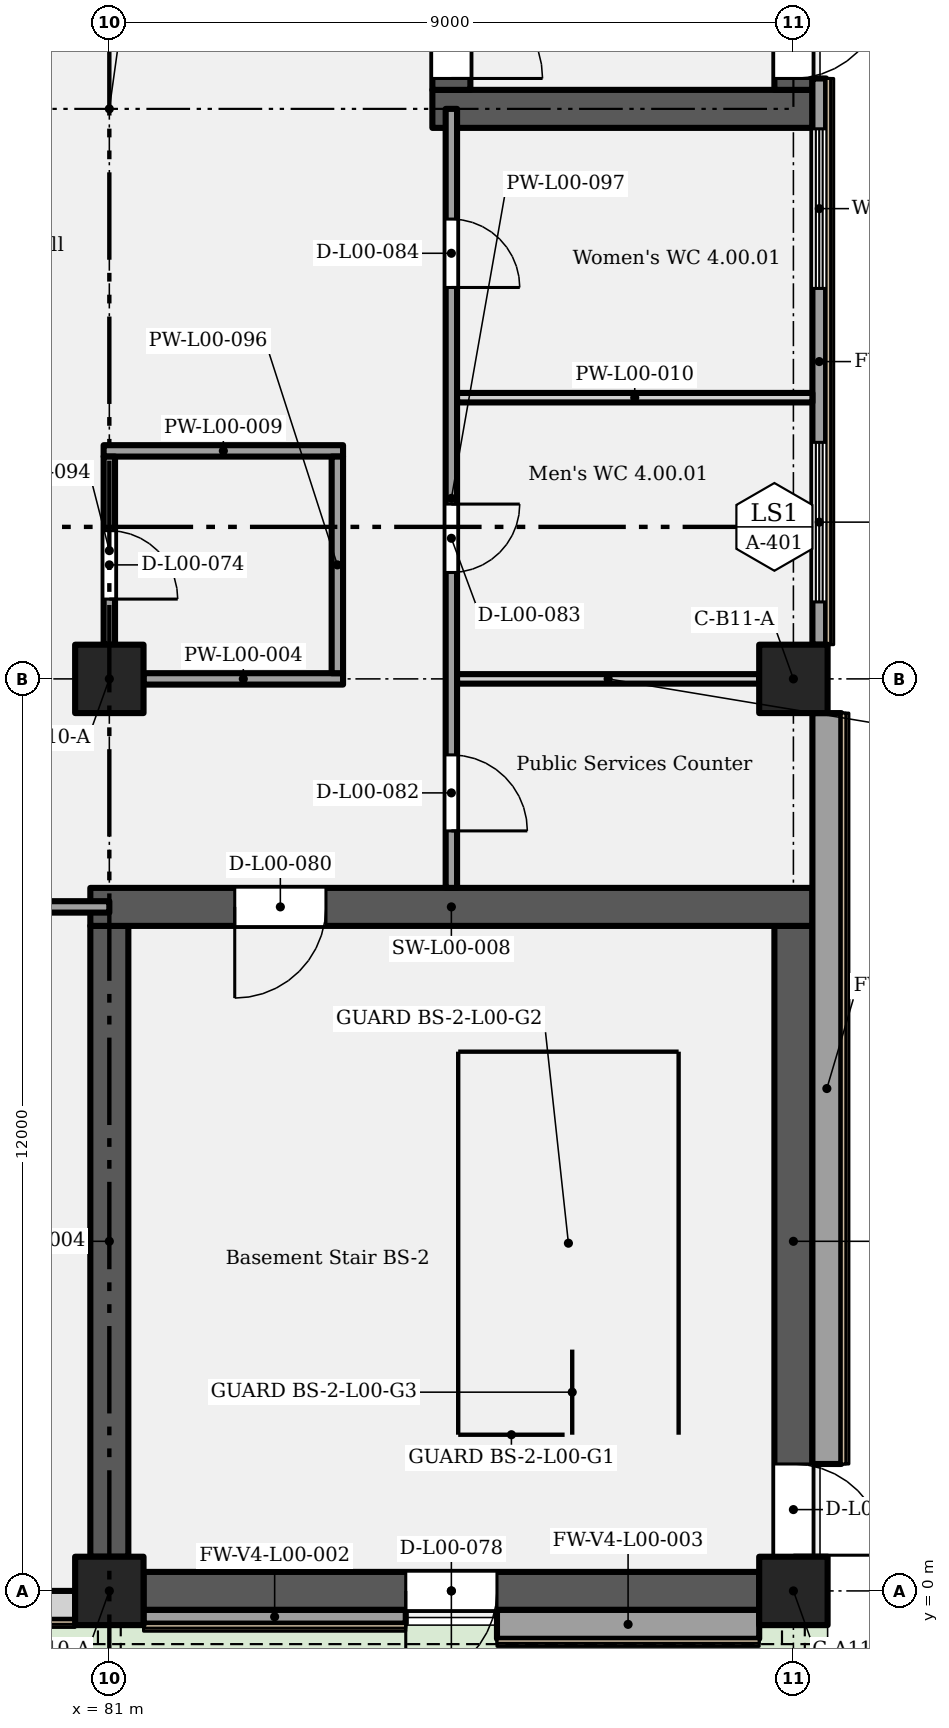
"""IFC4 building model, lengths in metres.
Left out: names, types, materials, properties, quantities, classifications, styles, units other than length and angle.
Written with IfcOpenShell. Run it as: python <this file> out.ifc"""

import sys

from ifc_helpers import new_model, si_unit, direction, frame, frame_2d, origin, origin_2d, place, context, subcontext, project, spatial, rectangle, extrude, element, fill, save


model = new_model("IFC4")
c1 = context("Model", 3, precision=1e-05, world=origin(), true_north=direction((0.0, 1.0)))
c2 = subcontext(c1, "Body", "Model", "MODEL_VIEW")
j1 = project(units=[si_unit("LENGTHUNIT", "METRE"), si_unit("PLANEANGLEUNIT", "RADIAN")], contexts=[c1])
p1 = place(None, origin())
s1 = spatial("IfcSite", under=j1, at=p1, CompositionType="ELEMENT")
p2 = place(p1, origin())
s2 = spatial("IfcBuilding", under=s1, at=p2, CompositionType="ELEMENT")
p3 = place(p2, origin())
s3 = spatial("IfcBuildingStorey", under=s2, at=p3, CompositionType="ELEMENT", Elevation=0.0)
for number, where, z_axis, x_axis in (
    (1, (81.0, 0.0, 0.0), (0.0, 0.0, 1.0), (1.0, 0.0, 0.0)),
    (2, (90.0, 0.0, 0.0), (0.0, 0.0, 1.0), (1.0, 0.0, 0.0)),
    (3, (81.0, 12.0, 0.0), (0.0, 0.0, 1.0), (1.0, 0.0, 0.0)),
    (4, (90.0, 12.0, 0.0), (0.0, 0.0, 1.0), (1.0, 0.0, 0.0)),
):
    element("IfcColumn", number, at=place(p3, frame(where, z_axis=z_axis, x_axis=x_axis)), inside=s3, PredefinedType="COLUMN", context=c2, shape_type="SweptSolid", body=[
        extrude(rectangle(XDim=0.9, YDim=0.9, at=origin_2d()), origin(), (0.0, 0.0, 1.0), 6.6),
    ])
p4 = place(p3, frame((81.45, 0.0, 0.0), z_axis=(0.0, 0.0, 1.0), x_axis=(1.0, 0.0, 0.0)))
e5 = element("IfcWall", 5, at=p4, inside=s3, PredefinedType="SHEAR", context=c2, shape_type="SweptSolid", body=[
    extrude(rectangle(XDim=8.1, YDim=0.5, at=frame_2d((4.05, 0.0))), origin(), (0.0, 0.0, 1.0), 6.3),
])
p5 = place(p4, frame((4.65, 0.0, 0.0), z_axis=(0.0, 0.0, 1.0), x_axis=(-1.0, 0.0, 0.0)))
e6 = element("IfcOpeningElement", 6, at=p5, cuts=e5, PredefinedType="OPENING", context=c2, shape_type="SweptSolid", body=[
    extrude(rectangle(XDim=1.2, YDim=2.1, at=frame_2d((0.6, 1.05))), frame((0.0, 0.26, 0.0), z_axis=(0.0, -1.0, 0.0), x_axis=(1.0, 0.0, 0.0)), (0.0, 0.0, 1.0), 0.52),
])
p6 = place(p3, frame((81.0, 0.45, 0.0), z_axis=(0.0, 0.0, 1.0), x_axis=(0.0, 1.0, 0.0)))
e7 = element("IfcWall", 7, at=p6, inside=s3, PredefinedType="SHEAR", context=c2, shape_type="SweptSolid", body=[
    extrude(rectangle(XDim=8.3, YDim=0.5, at=frame_2d((4.15, 0.0))), origin(), (0.0, 0.0, 1.0), 6.3),
])
p7 = place(p3, frame((90.0, 0.45, 0.0), z_axis=(0.0, 0.0, 1.0), x_axis=(0.0, 1.0, 0.0)))
e8 = element("IfcWall", 8, at=p7, inside=s3, PredefinedType="SHEAR", context=c2, shape_type="SweptSolid", body=[
    extrude(rectangle(XDim=8.3, YDim=0.5, at=frame_2d((4.15, 0.0))), origin(), (0.0, 0.0, 1.0), 6.3),
])
p8 = place(p7, frame((1.22, 0.0, 0.0), z_axis=(0.0, 0.0, 1.0), x_axis=(-1.0, 0.0, 0.0)))
e9 = element("IfcOpeningElement", 9, at=p8, cuts=e8, PredefinedType="OPENING", context=c2, shape_type="SweptSolid", body=[
    extrude(rectangle(XDim=1.2, YDim=2.1, at=frame_2d((0.6, 1.05))), frame((0.0, 0.26, 0.0), z_axis=(0.0, -1.0, 0.0), x_axis=(1.0, 0.0, 0.0)), (0.0, 0.0, 1.0), 0.52),
])
p9 = place(p3, frame((80.75, 9.0, 0.0), z_axis=(0.0, 0.0, 1.0), x_axis=(1.0, 0.0, 0.0)))
e10 = element("IfcWall", 10, at=p9, inside=s3, PredefinedType="SHEAR", context=c2, shape_type="SweptSolid", body=[
    extrude(rectangle(XDim=9.5, YDim=0.5, at=frame_2d((4.75, 0.0))), origin(), (0.0, 0.0, 1.0), 6.3),
])
p10 = place(p9, frame((3.1, 0.0, 0.0), z_axis=(0.0, 0.0, 1.0), x_axis=(-1.0, 0.0, 0.0)))
e11 = element("IfcOpeningElement", 11, at=p10, cuts=e10, PredefinedType="OPENING", context=c2, shape_type="SweptSolid", body=[
    extrude(rectangle(XDim=1.2, YDim=2.4, at=frame_2d((0.6, 1.2))), frame((0.0, 0.26, 0.0), z_axis=(0.0, -1.0, 0.0), x_axis=(1.0, 0.0, 0.0)), (0.0, 0.0, 1.0), 0.52),
])
p11 = place(p3, frame((85.25, 19.5, 0.0), z_axis=(0.0, 0.0, 1.0), x_axis=(1.0, 0.0, 0.0)))
e12 = element("IfcWall", 12, at=p11, inside=s3, PredefinedType="SHEAR", context=c2, shape_type="SweptSolid", body=[
    extrude(rectangle(XDim=5.0, YDim=0.5, at=frame_2d((2.5, 0.0))), origin(), (0.0, 0.0, 1.0), 6.3),
])
p12 = place(p3, frame((85.5, 19.75, 0.0), z_axis=(0.0, 0.0, 1.0), x_axis=(0.0, 1.0, 0.0)))
e13 = element("IfcWall", 13, at=p12, inside=s3, PredefinedType="SHEAR", context=c2, shape_type="SweptSolid", body=[
    extrude(rectangle(XDim=8.5, YDim=0.5, at=frame_2d((4.25, 0.0))), origin(), (0.0, 0.0, 1.0), 6.3),
])
p13 = place(p12, frame((1.35, 0.0, 0.0), z_axis=(0.0, 0.0, 1.0), x_axis=(-1.0, 0.0, 0.0)))
e14 = element("IfcOpeningElement", 14, at=p13, cuts=e13, PredefinedType="OPENING", context=c2, shape_type="SweptSolid", body=[
    extrude(rectangle(XDim=1.2, YDim=2.4, at=frame_2d((0.6, 1.2))), frame((0.0, 0.26, 0.0), z_axis=(0.0, -1.0, 0.0), x_axis=(1.0, 0.0, 0.0)), (0.0, 0.0, 1.0), 0.52),
])
p14 = place(p3, frame((90.0, 19.75, 0.0), z_axis=(0.0, 0.0, 1.0), x_axis=(0.0, 1.0, 0.0)))
e15 = element("IfcWall", 15, at=p14, inside=s3, PredefinedType="SHEAR", context=c2, shape_type="SweptSolid", body=[
    extrude(rectangle(XDim=8.3, YDim=0.5, at=frame_2d((4.15, 0.0))), origin(), (0.0, 0.0, 1.0), 6.3),
])
p15 = place(p14, frame((1.35, 0.0, 0.0), z_axis=(0.0, 0.0, 1.0), x_axis=(-1.0, 0.0, 0.0)))
e16 = element("IfcOpeningElement", 16, at=p15, cuts=e15, PredefinedType="OPENING", context=c2, shape_type="SweptSolid", body=[
    extrude(rectangle(XDim=1.2, YDim=2.1, at=frame_2d((0.6, 1.05))), frame((0.0, 0.26, 0.0), z_axis=(0.0, -1.0, 0.0), x_axis=(1.0, 0.0, 0.0)), (0.0, 0.0, 1.0), 0.52),
])
p16 = place(p3, frame((72.45, -0.19, 0.0), z_axis=(0.0, 0.0, 1.0), x_axis=(1.0, 0.0, 0.0)))
e17 = element("IfcWall", 17, at=p16, inside=s3, PredefinedType="SOLIDWALL", context=c2, shape_type="SweptSolid", body=[
    extrude(rectangle(XDim=8.1, YDim=0.38, at=frame_2d((4.05, 0.0))), origin(), (0.0, 0.0, 1.0), 6.3),
])
p17 = place(p16, frame((2.7, 0.0, 0.0), z_axis=(0.0, 0.0, 1.0), x_axis=(-1.0, 0.0, 0.0)))
e18 = element("IfcOpeningElement", 18, at=p17, cuts=e17, PredefinedType="OPENING", context=c2, shape_type="SweptSolid", body=[
    extrude(rectangle(XDim=1.8, YDim=2.1, at=frame_2d((0.9, 1.05))), frame((0.0, 0.2, 0.0), z_axis=(0.0, -1.0, 0.0), x_axis=(1.0, 0.0, 0.0)), (0.0, 0.0, 1.0), 0.4),
])
p18 = place(p16, frame((0.9, 0.0, 2.25)))
e19 = element("IfcOpeningElement", 19, at=p18, cuts=e17, PredefinedType="OPENING", context=c2, shape_type="SweptSolid", body=[
    extrude(rectangle(XDim=1.8, YDim=0.8, at=frame_2d((0.9, 0.4))), frame((0.0, 0.2, 0.0), z_axis=(0.0, -1.0, 0.0), x_axis=(1.0, 0.0, 0.0)), (0.0, 0.0, 1.0), 0.4),
])
p19 = place(p16, frame((7.2, 0.0, 0.0), z_axis=(0.0, 0.0, 1.0), x_axis=(-1.0, 0.0, 0.0)))
e20 = element("IfcOpeningElement", 20, at=p19, cuts=e17, PredefinedType="OPENING", context=c2, shape_type="SweptSolid", body=[
    extrude(rectangle(XDim=1.8, YDim=2.1, at=frame_2d((0.9, 1.05))), frame((0.0, 0.2, 0.0), z_axis=(0.0, -1.0, 0.0), x_axis=(1.0, 0.0, 0.0)), (0.0, 0.0, 1.0), 0.4),
])
p20 = place(p16, frame((5.4, 0.0, 2.25)))
e21 = element("IfcOpeningElement", 21, at=p20, cuts=e17, PredefinedType="OPENING", context=c2, shape_type="SweptSolid", body=[
    extrude(rectangle(XDim=1.8, YDim=0.8, at=frame_2d((0.9, 0.4))), frame((0.0, 0.2, 0.0), z_axis=(0.0, -1.0, 0.0), x_axis=(1.0, 0.0, 0.0)), (0.0, 0.0, 1.0), 0.4),
])
p21 = place(p3, frame((81.45, -0.34, 0.0), z_axis=(0.0, 0.0, 1.0), x_axis=(1.0, 0.0, 0.0)))
e22 = element("IfcWall", 22, at=p21, inside=s3, PredefinedType="SOLIDWALL", context=c2, shape_type="SweptSolid", body=[
    extrude(rectangle(XDim=3.45, YDim=0.18, at=frame_2d((1.725, 0.0))), origin(), (0.0, 0.0, 1.0), 6.3),
])
p22 = place(p3, frame((86.1, -0.44, 0.0), z_axis=(0.0, 0.0, 1.0), x_axis=(1.0, 0.0, 0.0)))
e23 = element("IfcWall", 23, at=p22, inside=s3, PredefinedType="SOLIDWALL", context=c2, shape_type="SweptSolid", body=[
    extrude(rectangle(XDim=3.45, YDim=0.38, at=frame_2d((1.725, 0.0))), origin(), (0.0, 0.0, 1.0), 6.3),
])
p23 = place(p3, frame((90.44, 1.67, 0.0), z_axis=(0.0, 0.0, 1.0), x_axis=(0.0, 1.0, 0.0)))
e24 = element("IfcWall", 24, at=p23, inside=s3, PredefinedType="SOLIDWALL", context=c2, shape_type="SweptSolid", body=[
    extrude(rectangle(XDim=9.88, YDim=0.38, at=frame_2d((4.94, 0.0))), origin(), (0.0, 0.0, 1.0), 6.3),
])
p24 = place(p3, frame((90.34, 12.45, 0.0), z_axis=(0.0, 0.0, 1.0), x_axis=(0.0, 1.0, 0.0)))
e25 = element("IfcWall", 25, at=p24, inside=s3, PredefinedType="SOLIDWALL", context=c2, shape_type="SweptSolid", body=[
    extrude(rectangle(XDim=7.45, YDim=0.18, at=frame_2d((3.725, 0.0))), origin(), (0.0, 0.0, 1.0), 6.3),
])
p25 = place(p24, frame((0.562, 0.0, 1.05)))
e26 = element("IfcOpeningElement", 26, at=p25, cuts=e25, PredefinedType="OPENING", context=c2, shape_type="SweptSolid", body=[
    extrude(rectangle(XDim=2.1, YDim=2.4, at=frame_2d((1.05, 1.2))), frame((0.0, 0.1, 0.0), z_axis=(0.0, -1.0, 0.0), x_axis=(1.0, 0.0, 0.0)), (0.0, 0.0, 1.0), 0.2),
])
p26 = place(p24, frame((4.688, 0.0, 1.05)))
e27 = element("IfcOpeningElement", 27, at=p26, cuts=e25, PredefinedType="OPENING", context=c2, shape_type="SweptSolid", body=[
    extrude(rectangle(XDim=2.1, YDim=2.4, at=frame_2d((1.05, 1.2))), frame((0.0, 0.1, 0.0), z_axis=(0.0, -1.0, 0.0), x_axis=(1.0, 0.0, 0.0)), (0.0, 0.0, 1.0), 0.2),
])
p27 = place(p3, frame((76.5, 9.0, 0.0), z_axis=(0.0, 0.0, 1.0), x_axis=(1.0, 0.0, 0.0)))
e28 = element("IfcWall", 28, at=p27, inside=s3, PredefinedType="PARTITIONING", context=c2, shape_type="SweptSolid", body=[
    extrude(rectangle(XDim=4.5, YDim=0.15, at=frame_2d((2.25, 0.0))), origin(), (0.0, 0.0, 1.0), 6.3),
])
p28 = place(p27, frame((3.15, 0.0, 0.0), z_axis=(0.0, 0.0, 1.0), x_axis=(-1.0, 0.0, 0.0)))
e29 = element("IfcOpeningElement", 29, at=p28, cuts=e28, PredefinedType="OPENING", context=c2, shape_type="SweptSolid", body=[
    extrude(rectangle(XDim=1.8, YDim=2.4, at=frame_2d((0.9, 1.2))), frame((0.0, 0.085, 0.0), z_axis=(0.0, -1.0, 0.0), x_axis=(1.0, 0.0, 0.0)), (0.0, 0.0, 1.0), 0.17),
])
p29 = place(p3, frame((81.45, 12.0, 0.0), z_axis=(0.0, 0.0, 1.0), x_axis=(1.0, 0.0, 0.0)))
e30 = element("IfcWall", 30, at=p29, inside=s3, PredefinedType="PARTITIONING", context=c2, shape_type="SweptSolid", body=[
    extrude(rectangle(XDim=2.625, YDim=0.15, at=frame_2d((1.312, 0.0))), origin(), (0.0, 0.0, 1.0), 5.55),
])
p30 = place(p3, frame((85.575, 12.0, 0.0), z_axis=(0.0, 0.0, 1.0), x_axis=(1.0, 0.0, 0.0)))
e31 = element("IfcWall", 31, at=p30, inside=s3, PredefinedType="PARTITIONING", context=c2, shape_type="SweptSolid", body=[
    extrude(rectangle(XDim=3.975, YDim=0.125, at=frame_2d((1.988, 0.0))), origin(), (0.0, 0.0, 1.0), 5.55),
])
p31 = place(p3, frame((80.925, 15.0, 0.0), z_axis=(0.0, 0.0, 1.0), x_axis=(1.0, 0.0, 0.0)))
e32 = element("IfcWall", 32, at=p31, inside=s3, PredefinedType="PARTITIONING", context=c2, shape_type="SweptSolid", body=[
    extrude(rectangle(XDim=3.15, YDim=0.15, at=frame_2d((1.575, 0.0))), origin(), (0.0, 0.0, 1.0), 6.3),
])
p32 = place(p3, frame((85.575, 15.7, 0.0), z_axis=(0.0, 0.0, 1.0), x_axis=(1.0, 0.0, 0.0)))
e33 = element("IfcWall", 33, at=p32, inside=s3, PredefinedType="PARTITIONING", context=c2, shape_type="SweptSolid", body=[
    extrude(rectangle(XDim=4.675, YDim=0.125, at=frame_2d((2.337, 0.0))), origin(), (0.0, 0.0, 1.0), 6.3),
])
p33 = place(p3, frame((81.0, 12.45, 0.0), z_axis=(0.0, 0.0, 1.0), x_axis=(0.0, 1.0, 0.0)))
e34 = element("IfcWall", 34, at=p33, inside=s3, PredefinedType="PARTITIONING", context=c2, shape_type="SweptSolid", body=[
    extrude(rectangle(XDim=2.475, YDim=0.15, at=frame_2d((1.238, 0.0))), origin(), (0.0, 0.0, 1.0), 5.35),
])
p34 = place(p33, frame((1.5, 0.0, 0.0), z_axis=(0.0, 0.0, 1.0), x_axis=(-1.0, 0.0, 0.0)))
e35 = element("IfcOpeningElement", 35, at=p34, cuts=e34, PredefinedType="OPENING", context=c2, shape_type="SweptSolid", body=[
    extrude(rectangle(XDim=0.9, YDim=2.4, at=frame_2d((0.45, 1.2))), frame((0.0, 0.085, 0.0), z_axis=(0.0, -1.0, 0.0), x_axis=(1.0, 0.0, 0.0)), (0.0, 0.0, 1.0), 0.17),
])
p35 = place(p3, frame((84.0, 12.075, 0.0), z_axis=(0.0, 0.0, 1.0), x_axis=(0.0, 1.0, 0.0)))
e36 = element("IfcWall", 36, at=p35, inside=s3, PredefinedType="PARTITIONING", context=c2, shape_type="SweptSolid", body=[
    extrude(rectangle(XDim=2.85, YDim=0.15, at=frame_2d((1.425, 0.0))), origin(), (0.0, 0.0, 1.0), 6.3),
])
p36 = place(p3, frame((85.5, 9.25, 0.0), z_axis=(0.0, 0.0, 1.0), x_axis=(0.0, 1.0, 0.0)))
e37 = element("IfcWall", 37, at=p36, inside=s3, PredefinedType="PARTITIONING", context=c2, shape_type="SweptSolid", body=[
    extrude(rectangle(XDim=10.25, YDim=0.15, at=frame_2d((5.125, 0.0))), origin(), (0.0, 0.0, 1.0), 6.3),
])
p37 = place(p36, frame((1.75, 0.0, 0.0), z_axis=(0.0, 0.0, 1.0), x_axis=(-1.0, 0.0, 0.0)))
e38 = element("IfcOpeningElement", 38, at=p37, cuts=e37, PredefinedType="OPENING", context=c2, shape_type="SweptSolid", body=[
    extrude(rectangle(XDim=1.0, YDim=2.4, at=frame_2d((0.5, 1.2))), frame((0.0, 0.085, 0.0), z_axis=(0.0, -1.0, 0.0), x_axis=(1.0, 0.0, 0.0)), (0.0, 0.0, 1.0), 0.17),
])
p38 = place(p36, frame((5.05, 0.0, 0.0), z_axis=(0.0, 0.0, 1.0), x_axis=(-1.0, 0.0, 0.0)))
e39 = element("IfcOpeningElement", 39, at=p38, cuts=e37, PredefinedType="OPENING", context=c2, shape_type="SweptSolid", body=[
    extrude(rectangle(XDim=0.9, YDim=2.4, at=frame_2d((0.45, 1.2))), frame((0.0, 0.085, 0.0), z_axis=(0.0, -1.0, 0.0), x_axis=(1.0, 0.0, 0.0)), (0.0, 0.0, 1.0), 0.17),
])
p39 = place(p36, frame((8.8, 0.0, 0.0), z_axis=(0.0, 0.0, 1.0), x_axis=(-1.0, 0.0, 0.0)))
e40 = element("IfcOpeningElement", 40, at=p39, cuts=e37, PredefinedType="OPENING", context=c2, shape_type="SweptSolid", body=[
    extrude(rectangle(XDim=0.9, YDim=2.4, at=frame_2d((0.45, 1.2))), frame((0.0, 0.085, 0.0), z_axis=(0.0, -1.0, 0.0), x_axis=(1.0, 0.0, 0.0)), (0.0, 0.0, 1.0), 0.17),
])
p40 = place(p5, origin())
e41 = element("IfcDoor", 41, at=p40, inside=s3, OperationType="SINGLE_SWING_LEFT", PredefinedType="DOOR", context=c2, shape_type="SweptSolid", body=[
    extrude(rectangle(XDim=1.2, YDim=2.1, at=frame_2d((0.6, 1.05))), frame((0.0, 0.025, 0.0), z_axis=(0.0, -1.0, 0.0), x_axis=(1.0, 0.0, 0.0)), (0.0, 0.0, 1.0), 0.05),
])
fill(e6, e41)
p41 = place(p8, origin())
e42 = element("IfcDoor", 42, at=p41, inside=s3, OperationType="SINGLE_SWING_LEFT", PredefinedType="DOOR", context=c2, shape_type="SweptSolid", body=[
    extrude(rectangle(XDim=1.2, YDim=2.1, at=frame_2d((0.6, 1.05))), frame((0.0, 0.025, 0.0), z_axis=(0.0, -1.0, 0.0), x_axis=(1.0, 0.0, 0.0)), (0.0, 0.0, 1.0), 0.05),
])
fill(e9, e42)
p42 = place(p25, origin())
e43 = element("IfcWindow", 43, at=p42, inside=s3, PartitioningType="SINGLE_PANEL", PredefinedType="WINDOW", context=c2, shape_type="SweptSolid", body=[
    extrude(rectangle(XDim=2.1, YDim=2.4, at=frame_2d((1.05, 1.2))), frame((0.0, 0.03, 0.0), z_axis=(0.0, -1.0, 0.0), x_axis=(1.0, 0.0, 0.0)), (0.0, 0.0, 1.0), 0.06),
])
fill(e26, e43)
p43 = place(p26, origin())
e44 = element("IfcWindow", 44, at=p43, inside=s3, PartitioningType="SINGLE_PANEL", PredefinedType="WINDOW", context=c2, shape_type="SweptSolid", body=[
    extrude(rectangle(XDim=2.1, YDim=2.4, at=frame_2d((1.05, 1.2))), frame((0.0, 0.03, 0.0), z_axis=(0.0, -1.0, 0.0), x_axis=(1.0, 0.0, 0.0)), (0.0, 0.0, 1.0), 0.06),
])
fill(e27, e44)
p44 = place(p15, origin())
e45 = element("IfcDoor", 45, at=p44, inside=s3, OperationType="SINGLE_SWING_RIGHT", PredefinedType="DOOR", context=c2, shape_type="SweptSolid", body=[
    extrude(rectangle(XDim=1.2, YDim=2.1, at=frame_2d((0.6, 1.05))), frame((0.0, 0.025, 0.0), z_axis=(0.0, -1.0, 0.0), x_axis=(1.0, 0.0, 0.0)), (0.0, 0.0, 1.0), 0.05),
])
fill(e16, e45)
p45 = place(p34, origin())
e46 = element("IfcDoor", 46, at=p45, inside=s3, OperationType="SINGLE_SWING_RIGHT", PredefinedType="DOOR", context=c2, shape_type="SweptSolid", body=[
    extrude(rectangle(XDim=0.9, YDim=2.4, at=frame_2d((0.45, 1.2))), frame((0.0, 0.025, 0.0), z_axis=(0.0, -1.0, 0.0), x_axis=(1.0, 0.0, 0.0)), (0.0, 0.0, 1.0), 0.05),
])
fill(e35, e46)
p46 = place(p10, origin())
e47 = element("IfcDoor", 47, at=p46, inside=s3, OperationType="SINGLE_SWING_RIGHT", PredefinedType="DOOR", context=c2, shape_type="SweptSolid", body=[
    extrude(rectangle(XDim=1.2, YDim=2.4, at=frame_2d((0.6, 1.2))), frame((0.0, 0.025, 0.0), z_axis=(0.0, -1.0, 0.0), x_axis=(1.0, 0.0, 0.0)), (0.0, 0.0, 1.0), 0.05),
])
fill(e11, e47)
p47 = place(p37, origin())
e48 = element("IfcDoor", 48, at=p47, inside=s3, OperationType="SINGLE_SWING_RIGHT", PredefinedType="DOOR", context=c2, shape_type="SweptSolid", body=[
    extrude(rectangle(XDim=1.0, YDim=2.4, at=frame_2d((0.5, 1.2))), frame((0.0, 0.025, 0.0), z_axis=(0.0, -1.0, 0.0), x_axis=(1.0, 0.0, 0.0)), (0.0, 0.0, 1.0), 0.05),
])
fill(e38, e48)
p48 = place(p38, origin())
e49 = element("IfcDoor", 49, at=p48, inside=s3, OperationType="SINGLE_SWING_LEFT", PredefinedType="DOOR", context=c2, shape_type="SweptSolid", body=[
    extrude(rectangle(XDim=0.9, YDim=2.4, at=frame_2d((0.45, 1.2))), frame((0.0, 0.025, 0.0), z_axis=(0.0, -1.0, 0.0), x_axis=(1.0, 0.0, 0.0)), (0.0, 0.0, 1.0), 0.05),
])
fill(e39, e49)
p49 = place(p39, origin())
e50 = element("IfcDoor", 50, at=p49, inside=s3, OperationType="SINGLE_SWING_RIGHT", PredefinedType="DOOR", context=c2, shape_type="SweptSolid", body=[
    extrude(rectangle(XDim=0.9, YDim=2.4, at=frame_2d((0.45, 1.2))), frame((0.0, 0.025, 0.0), z_axis=(0.0, -1.0, 0.0), x_axis=(1.0, 0.0, 0.0)), (0.0, 0.0, 1.0), 0.05),
])
fill(e40, e50)
p50 = place(p13, origin())
e51 = element("IfcDoor", 51, at=p50, inside=s3, OperationType="SINGLE_SWING_RIGHT", PredefinedType="DOOR", context=c2, shape_type="SweptSolid", body=[
    extrude(rectangle(XDim=1.2, YDim=2.4, at=frame_2d((0.6, 1.2))), frame((0.0, 0.025, 0.0), z_axis=(0.0, -1.0, 0.0), x_axis=(1.0, 0.0, 0.0)), (0.0, 0.0, 1.0), 0.05),
])
fill(e14, e51)
save(model, sys.argv[1])
